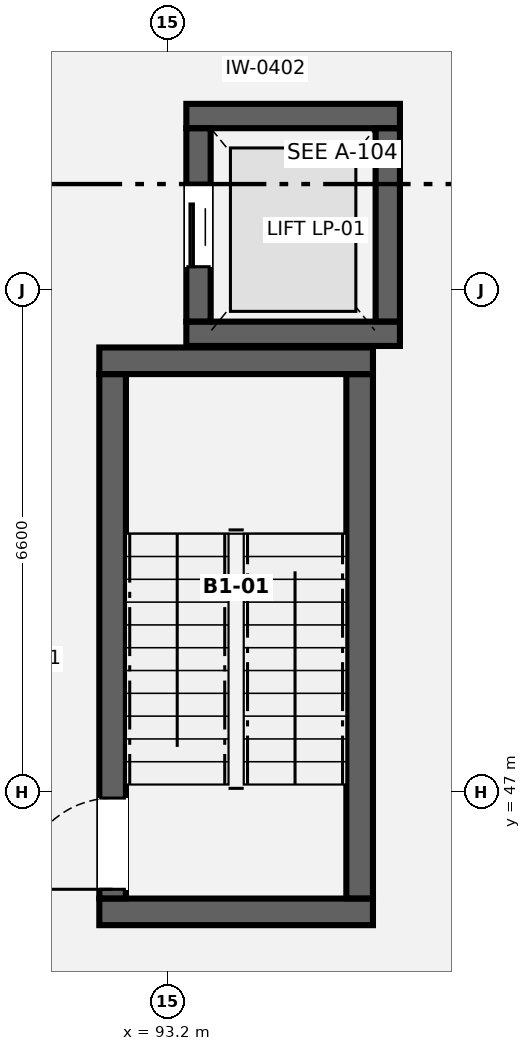
"""IFC4 building model, lengths in metres.
Left out: names, types, materials, properties, quantities, classifications, styles, units other than length and angle.
Written with IfcOpenShell. Run it as: python <this file> out.ifc"""

import sys

from ifc_helpers import new_model, si_unit, direction, frame, frame_2d, origin, place, context, subcontext, project, spatial, rectangle, extrude, element, fill, save


model = new_model("IFC4")
c1 = context("Model", 3, precision=1e-05, world=origin(), true_north=direction((0.0, 1.0)))
c2 = subcontext(c1, "Body", "Model", "MODEL_VIEW")
j1 = project(units=[si_unit("LENGTHUNIT", "METRE"), si_unit("PLANEANGLEUNIT", "RADIAN")], contexts=[c1])
p1 = place(None, origin())
s1 = spatial("IfcSite", under=j1, at=p1, CompositionType="ELEMENT")
p2 = place(p1, origin())
s2 = spatial("IfcBuilding", under=s1, at=p2, CompositionType="ELEMENT")
p3 = place(p2, frame((0.0, 0.0, -4.2)))
s3 = spatial("IfcBuildingStorey", under=s2, at=p3, CompositionType="ELEMENT", Elevation=-4.2)
for number, where, z_axis, x_axis in (
    (1, (92.3, 45.425, 0.0), (0.0, 0.0, 1.0), (1.0, 0.0, 0.0)),
    (2, (92.3, 52.675, 0.0), (0.0, 0.0, 1.0), (1.0, 0.0, 0.0)),
):
    element("IfcWall", number, at=place(p3, frame(where, z_axis=z_axis, x_axis=x_axis)), inside=s3, PredefinedType="SHEAR", context=c2, shape_type="SweptSolid", body=[
        extrude(rectangle(XDim=3.6, YDim=0.35, at=frame_2d((1.8, 0.0))), origin(), (0.0, 0.0, 1.0), 3.94),
    ])
p4 = place(p3, frame((92.475, 45.602, 0.0), z_axis=(0.0, 0.0, 1.0), x_axis=(0.0, 1.0, 0.0)))
e3 = element("IfcWall", 3, at=p4, inside=s3, PredefinedType="SHEAR", context=c2, shape_type="SweptSolid", body=[
    extrude(rectangle(XDim=6.896, YDim=0.35, at=frame_2d((3.448, 0.0))), origin(), (0.0, 0.0, 1.0), 3.94),
])
p5 = place(p4, frame((0.12, 0.0, 0.0)))
e4 = element("IfcOpeningElement", 4, at=p5, cuts=e3, PredefinedType="OPENING", context=c2, shape_type="SweptSolid", body=[
    extrude(rectangle(XDim=1.2, YDim=2.15, at=frame_2d((0.6, 1.075))), frame((0.0, 0.185, 0.0), z_axis=(0.0, -1.0, 0.0), x_axis=(1.0, 0.0, 0.0)), (0.0, 0.0, 1.0), 0.37),
])
p6 = place(p3, frame((95.725, 45.602, 0.0), z_axis=(0.0, 0.0, 1.0), x_axis=(0.0, 1.0, 0.0)))
e5 = element("IfcWall", 5, at=p6, inside=s3, PredefinedType="SHEAR", context=c2, shape_type="SweptSolid", body=[
    extrude(rectangle(XDim=6.896, YDim=0.35, at=frame_2d((3.448, 0.0))), origin(), (0.0, 0.0, 1.0), 3.94),
])
for number, where, z_axis, x_axis in (
    (6, (93.445, 53.03, 0.0), (0.0, 0.0, 1.0), (1.0, 0.0, 0.0)),
    (7, (93.445, 55.895, 0.0), (0.0, 0.0, 1.0), (1.0, 0.0, 0.0)),
):
    element("IfcWall", number, at=place(p3, frame(where, z_axis=z_axis, x_axis=x_axis)), inside=s3, PredefinedType="SHEAR", context=c2, shape_type="SweptSolid", body=[
        extrude(rectangle(XDim=2.81, YDim=0.32, at=frame_2d((1.405, 0.0))), origin(), (0.0, 0.0, 1.0), 3.94),
    ])
p7 = place(p3, frame((93.605, 53.192, 0.0), z_axis=(0.0, 0.0, 1.0), x_axis=(0.0, 1.0, 0.0)))
e8 = element("IfcWall", 8, at=p7, inside=s3, PredefinedType="SHEAR", context=c2, shape_type="SweptSolid", body=[
    extrude(rectangle(XDim=2.541, YDim=0.32, at=frame_2d((1.271, 0.0))), origin(), (0.0, 0.0, 1.0), 3.94),
])
p8 = place(p7, frame((0.72, 0.0, 0.0)))
e9 = element("IfcOpeningElement", 9, at=p8, cuts=e8, PredefinedType="OPENING", context=c2, shape_type="SweptSolid", body=[
    extrude(rectangle(XDim=1.1, YDim=2.15, at=frame_2d((0.55, 1.075))), frame((0.0, 0.17, 0.0), z_axis=(0.0, -1.0, 0.0), x_axis=(1.0, 0.0, 0.0)), (0.0, 0.0, 1.0), 0.34),
])
p9 = place(p3, frame((96.095, 53.192, 0.0), z_axis=(0.0, 0.0, 1.0), x_axis=(0.0, 1.0, 0.0)))
e10 = element("IfcWall", 10, at=p9, inside=s3, PredefinedType="SHEAR", context=c2, shape_type="SweptSolid", body=[
    extrude(rectangle(XDim=2.541, YDim=0.32, at=frame_2d((1.271, 0.0))), origin(), (0.0, 0.0, 1.0), 3.94),
])
p10 = place(p5, origin())
e11 = element("IfcDoor", 11, at=p10, inside=s3, OperationType="SINGLE_SWING_LEFT", PredefinedType="DOOR", context=c2, shape_type="SweptSolid", body=[
    extrude(rectangle(XDim=1.2, YDim=2.15, at=frame_2d((0.6, 1.075))), frame((0.0, 0.025, 0.0), z_axis=(0.0, -1.0, 0.0), x_axis=(1.0, 0.0, 0.0)), (0.0, 0.0, 1.0), 0.05),
])
fill(e4, e11)
p11 = place(p8, origin())
e12 = element("IfcDoor", 12, at=p11, inside=s3, OperationType="SLIDING_TO_LEFT", PredefinedType="DOOR", context=c2, shape_type="SweptSolid", body=[
    extrude(rectangle(XDim=1.1, YDim=2.15, at=frame_2d((0.55, 1.075))), frame((0.0, 0.025, 0.0), z_axis=(0.0, -1.0, 0.0), x_axis=(1.0, 0.0, 0.0)), (0.0, 0.0, 1.0), 0.05),
])
fill(e9, e12)
save(model, sys.argv[1])
